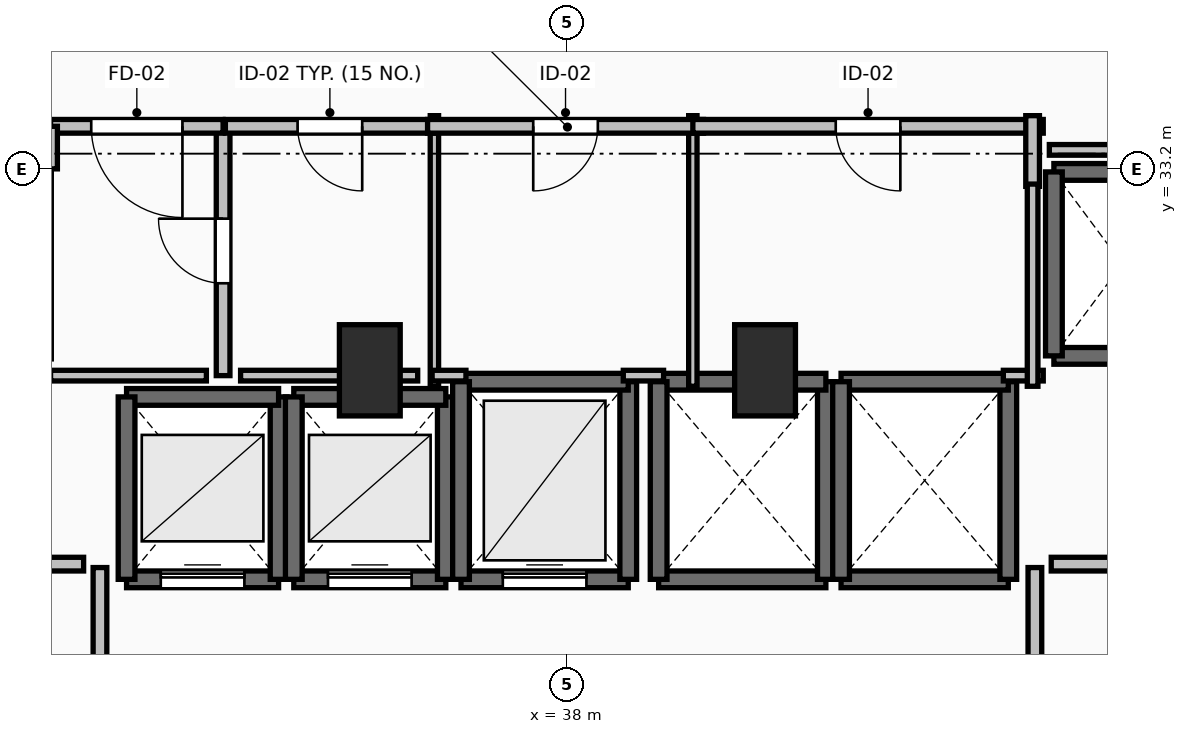
"""IFC4 building model, lengths in metres.
Left out: names, types, materials, properties, quantities, classifications, styles, units other than length and angle.
Written with IfcOpenShell. Run it as: python <this file> out.ifc"""

import sys

from ifc_helpers import new_model, si_unit, direction, frame, frame_2d, origin, origin_2d, place, context, subcontext, project, spatial, rectangle, extrude, element, fill, save


model = new_model("IFC4")
c1 = context("Model", 3, precision=1e-05, world=origin(), true_north=direction((0.0, 1.0)))
c2 = subcontext(c1, "Body", "Model", "MODEL_VIEW")
j1 = project(units=[si_unit("LENGTHUNIT", "METRE"), si_unit("PLANEANGLEUNIT", "RADIAN")], contexts=[c1])
p1 = place(None, origin())
s1 = spatial("IfcSite", under=j1, at=p1, CompositionType="ELEMENT")
p2 = place(p1, origin())
s2 = spatial("IfcBuilding", under=s1, at=p2, CompositionType="ELEMENT")
p3 = place(p2, frame((0.0, 0.0, 48.5)))
s3 = spatial("IfcBuildingStorey", under=s2, at=p3, CompositionType="ELEMENT", Elevation=48.5)
for number, where, z_axis, x_axis in (
    (1, (35.4, 30.55, 0.0), (0.0, 0.0, 1.0), (1.0, 0.0, 0.0)),
    (2, (40.6, 30.55, 0.0), (0.0, 0.0, 1.0), (1.0, 0.0, 0.0)),
):
    element("IfcColumn", number, at=place(p3, frame(where, z_axis=z_axis, x_axis=x_axis)), inside=s3, PredefinedType="PILASTER", context=c2, shape_type="SweptSolid", body=[
        extrude(rectangle(XDim=0.8, YDim=1.2, at=origin_2d()), origin(), (0.0, 0.0, 1.0), 3.5),
    ])
p4 = place(p3, frame((32.2, 27.8, 0.0), z_axis=(0.0, 0.0, 1.0), x_axis=(1.0, 0.0, 0.0)))
e3 = element("IfcWall", 3, at=p4, inside=s3, PredefinedType="SOLIDWALL", context=c2, shape_type="SweptSolid", body=[
    extrude(rectangle(XDim=2.0, YDim=0.22, at=frame_2d((1.0, 0.0))), origin(), (0.0, 0.0, 1.0), 3.24),
])
p5 = place(p4, frame((0.45, 0.0, 0.0)))
e4 = element("IfcOpeningElement", 4, at=p5, cuts=e3, PredefinedType="OPENING", context=c2, shape_type="SweptSolid", body=[
    extrude(rectangle(XDim=1.1, YDim=2.2, at=frame_2d((0.55, 1.1))), frame((0.0, 0.125, 0.0), z_axis=(0.0, -1.0, 0.0), x_axis=(1.0, 0.0, 0.0)), (0.0, 0.0, 1.0), 0.25),
])
p6 = place(p3, frame((34.2, 27.8, 0.0), z_axis=(0.0, 0.0, 1.0), x_axis=(0.0, 1.0, 0.0)))
e5 = element("IfcWall", 5, at=p6, inside=s3, PredefinedType="SOLIDWALL", context=c2, shape_type="SweptSolid", body=[
    extrude(rectangle(XDim=2.4, YDim=0.22, at=frame_2d((1.2, 0.0))), origin(), (0.0, 0.0, 1.0), 3.24),
])
p7 = place(p3, frame((34.2, 30.2, 0.0), z_axis=(0.0, 0.0, 1.0), x_axis=(-1.0, 0.0, 0.0)))
e6 = element("IfcWall", 6, at=p7, inside=s3, PredefinedType="SOLIDWALL", context=c2, shape_type="SweptSolid", body=[
    extrude(rectangle(XDim=2.0, YDim=0.22, at=frame_2d((1.0, 0.0))), origin(), (0.0, 0.0, 1.0), 3.24),
])
p8 = place(p3, frame((32.2, 30.2, 0.0), z_axis=(0.0, 0.0, 1.0), x_axis=(0.0, -1.0, 0.0)))
e7 = element("IfcWall", 7, at=p8, inside=s3, PredefinedType="SOLIDWALL", context=c2, shape_type="SweptSolid", body=[
    extrude(rectangle(XDim=2.4, YDim=0.22, at=frame_2d((1.2, 0.0))), origin(), (0.0, 0.0, 1.0), 3.24),
])
p9 = place(p3, frame((34.4, 27.8, 0.0), z_axis=(0.0, 0.0, 1.0), x_axis=(1.0, 0.0, 0.0)))
e8 = element("IfcWall", 8, at=p9, inside=s3, PredefinedType="SOLIDWALL", context=c2, shape_type="SweptSolid", body=[
    extrude(rectangle(XDim=2.0, YDim=0.22, at=frame_2d((1.0, 0.0))), origin(), (0.0, 0.0, 1.0), 3.24),
])
p10 = place(p9, frame((0.45, 0.0, 0.0)))
e9 = element("IfcOpeningElement", 9, at=p10, cuts=e8, PredefinedType="OPENING", context=c2, shape_type="SweptSolid", body=[
    extrude(rectangle(XDim=1.1, YDim=2.2, at=frame_2d((0.55, 1.1))), frame((0.0, 0.125, 0.0), z_axis=(0.0, -1.0, 0.0), x_axis=(1.0, 0.0, 0.0)), (0.0, 0.0, 1.0), 0.25),
])
p11 = place(p3, frame((36.4, 27.8, 0.0), z_axis=(0.0, 0.0, 1.0), x_axis=(0.0, 1.0, 0.0)))
e10 = element("IfcWall", 10, at=p11, inside=s3, PredefinedType="SOLIDWALL", context=c2, shape_type="SweptSolid", body=[
    extrude(rectangle(XDim=2.4, YDim=0.22, at=frame_2d((1.2, 0.0))), origin(), (0.0, 0.0, 1.0), 3.24),
])
p12 = place(p3, frame((36.4, 30.2, 0.0), z_axis=(0.0, 0.0, 1.0), x_axis=(-1.0, 0.0, 0.0)))
e11 = element("IfcWall", 11, at=p12, inside=s3, PredefinedType="SOLIDWALL", context=c2, shape_type="SweptSolid", body=[
    extrude(rectangle(XDim=2.0, YDim=0.22, at=frame_2d((1.0, 0.0))), origin(), (0.0, 0.0, 1.0), 3.24),
])
p13 = place(p3, frame((34.4, 30.2, 0.0), z_axis=(0.0, 0.0, 1.0), x_axis=(0.0, -1.0, 0.0)))
e12 = element("IfcWall", 12, at=p13, inside=s3, PredefinedType="SOLIDWALL", context=c2, shape_type="SweptSolid", body=[
    extrude(rectangle(XDim=2.4, YDim=0.22, at=frame_2d((1.2, 0.0))), origin(), (0.0, 0.0, 1.0), 3.24),
])
p14 = place(p3, frame((36.6, 27.8, 0.0), z_axis=(0.0, 0.0, 1.0), x_axis=(1.0, 0.0, 0.0)))
e13 = element("IfcWall", 13, at=p14, inside=s3, PredefinedType="SOLIDWALL", context=c2, shape_type="SweptSolid", body=[
    extrude(rectangle(XDim=2.2, YDim=0.22, at=frame_2d((1.1, 0.0))), origin(), (0.0, 0.0, 1.0), 3.24),
])
p15 = place(p14, frame((0.55, 0.0, 0.0)))
e14 = element("IfcOpeningElement", 14, at=p15, cuts=e13, PredefinedType="OPENING", context=c2, shape_type="SweptSolid", body=[
    extrude(rectangle(XDim=1.1, YDim=2.2, at=frame_2d((0.55, 1.1))), frame((0.0, 0.125, 0.0), z_axis=(0.0, -1.0, 0.0), x_axis=(1.0, 0.0, 0.0)), (0.0, 0.0, 1.0), 0.25),
])
p16 = place(p3, frame((38.8, 27.8, 0.0), z_axis=(0.0, 0.0, 1.0), x_axis=(0.0, 1.0, 0.0)))
e15 = element("IfcWall", 15, at=p16, inside=s3, PredefinedType="SOLIDWALL", context=c2, shape_type="SweptSolid", body=[
    extrude(rectangle(XDim=2.6, YDim=0.22, at=frame_2d((1.3, 0.0))), origin(), (0.0, 0.0, 1.0), 3.24),
])
p17 = place(p3, frame((38.8, 30.4, 0.0), z_axis=(0.0, 0.0, 1.0), x_axis=(-1.0, 0.0, 0.0)))
e16 = element("IfcWall", 16, at=p17, inside=s3, PredefinedType="SOLIDWALL", context=c2, shape_type="SweptSolid", body=[
    extrude(rectangle(XDim=2.2, YDim=0.22, at=frame_2d((1.1, 0.0))), origin(), (0.0, 0.0, 1.0), 3.24),
])
p18 = place(p3, frame((36.6, 30.4, 0.0), z_axis=(0.0, 0.0, 1.0), x_axis=(0.0, -1.0, 0.0)))
e17 = element("IfcWall", 17, at=p18, inside=s3, PredefinedType="SOLIDWALL", context=c2, shape_type="SweptSolid", body=[
    extrude(rectangle(XDim=2.6, YDim=0.22, at=frame_2d((1.3, 0.0))), origin(), (0.0, 0.0, 1.0), 3.24),
])
p19 = place(p3, frame((39.2, 27.8, 0.0), z_axis=(0.0, 0.0, 1.0), x_axis=(1.0, 0.0, 0.0)))
e18 = element("IfcWall", 18, at=p19, inside=s3, PredefinedType="SOLIDWALL", context=c2, shape_type="SweptSolid", body=[
    extrude(rectangle(XDim=2.2, YDim=0.22, at=frame_2d((1.1, 0.0))), origin(), (0.0, 0.0, 1.0), 3.24),
])
p20 = place(p3, frame((41.4, 27.8, 0.0), z_axis=(0.0, 0.0, 1.0), x_axis=(0.0, 1.0, 0.0)))
e19 = element("IfcWall", 19, at=p20, inside=s3, PredefinedType="SOLIDWALL", context=c2, shape_type="SweptSolid", body=[
    extrude(rectangle(XDim=2.6, YDim=0.22, at=frame_2d((1.3, 0.0))), origin(), (0.0, 0.0, 1.0), 3.24),
])
p21 = place(p3, frame((41.4, 30.4, 0.0), z_axis=(0.0, 0.0, 1.0), x_axis=(-1.0, 0.0, 0.0)))
e20 = element("IfcWall", 20, at=p21, inside=s3, PredefinedType="SOLIDWALL", context=c2, shape_type="SweptSolid", body=[
    extrude(rectangle(XDim=2.2, YDim=0.22, at=frame_2d((1.1, 0.0))), origin(), (0.0, 0.0, 1.0), 3.24),
])
p22 = place(p3, frame((39.2, 30.4, 0.0), z_axis=(0.0, 0.0, 1.0), x_axis=(0.0, -1.0, 0.0)))
e21 = element("IfcWall", 21, at=p22, inside=s3, PredefinedType="SOLIDWALL", context=c2, shape_type="SweptSolid", body=[
    extrude(rectangle(XDim=2.6, YDim=0.22, at=frame_2d((1.3, 0.0))), origin(), (0.0, 0.0, 1.0), 3.24),
])
p23 = place(p3, frame((41.6, 27.8, 0.0), z_axis=(0.0, 0.0, 1.0), x_axis=(1.0, 0.0, 0.0)))
e22 = element("IfcWall", 22, at=p23, inside=s3, PredefinedType="SOLIDWALL", context=c2, shape_type="SweptSolid", body=[
    extrude(rectangle(XDim=2.2, YDim=0.22, at=frame_2d((1.1, 0.0))), origin(), (0.0, 0.0, 1.0), 3.24),
])
p24 = place(p3, frame((43.8, 27.8, 0.0), z_axis=(0.0, 0.0, 1.0), x_axis=(0.0, 1.0, 0.0)))
e23 = element("IfcWall", 23, at=p24, inside=s3, PredefinedType="SOLIDWALL", context=c2, shape_type="SweptSolid", body=[
    extrude(rectangle(XDim=2.6, YDim=0.22, at=frame_2d((1.3, 0.0))), origin(), (0.0, 0.0, 1.0), 3.24),
])
p25 = place(p3, frame((43.8, 30.4, 0.0), z_axis=(0.0, 0.0, 1.0), x_axis=(-1.0, 0.0, 0.0)))
e24 = element("IfcWall", 24, at=p25, inside=s3, PredefinedType="SOLIDWALL", context=c2, shape_type="SweptSolid", body=[
    extrude(rectangle(XDim=2.2, YDim=0.22, at=frame_2d((1.1, 0.0))), origin(), (0.0, 0.0, 1.0), 3.24),
])
p26 = place(p3, frame((41.6, 30.4, 0.0), z_axis=(0.0, 0.0, 1.0), x_axis=(0.0, -1.0, 0.0)))
e25 = element("IfcWall", 25, at=p26, inside=s3, PredefinedType="SOLIDWALL", context=c2, shape_type="SweptSolid", body=[
    extrude(rectangle(XDim=2.6, YDim=0.22, at=frame_2d((1.3, 0.0))), origin(), (0.0, 0.0, 1.0), 3.24),
])
for number, where, z_axis, x_axis in (
    (26, (44.4, 30.74, 0.0), (0.0, 0.0, 1.0), (1.0, 0.0, 0.0)),
    (27, (46.2, 33.16, 0.0), (0.0, 0.0, 1.0), (-1.0, 0.0, 0.0)),
):
    element("IfcWall", number, at=place(p3, frame(where, z_axis=z_axis, x_axis=x_axis)), inside=s3, PredefinedType="SOLIDWALL", context=c2, shape_type="SweptSolid", body=[
        extrude(rectangle(XDim=1.8, YDim=0.22, at=frame_2d((0.9, 0.0))), origin(), (0.0, 0.0, 1.0), 3.24),
    ])
p27 = place(p3, frame((44.4, 33.16, 0.0), z_axis=(0.0, 0.0, 1.0), x_axis=(0.0, -1.0, 0.0)))
e28 = element("IfcWall", 28, at=p27, inside=s3, PredefinedType="SOLIDWALL", context=c2, shape_type="SweptSolid", body=[
    extrude(rectangle(XDim=2.42, YDim=0.22, at=frame_2d((1.21, 0.0))), origin(), (0.0, 0.0, 1.0), 3.24),
])
p28 = place(p3, frame((31.85, 24.045, 0.0), z_axis=(0.0, 0.0, 1.0), x_axis=(0.0, 1.0, 0.0)))
e29 = element("IfcWall", 29, at=p28, inside=s3, PredefinedType="PARTITIONING", context=c2, shape_type="SweptSolid", body=[
    extrude(rectangle(XDim=3.91, YDim=0.18, at=frame_2d((1.955, 0.0))), origin(), (0.0, 0.0, 1.0), 3.24),
])
p29 = place(p28, frame((1.355, 0.0, 0.0)))
e30 = element("IfcOpeningElement", 30, at=p29, cuts=e29, PredefinedType="OPENING", context=c2, shape_type="SweptSolid", body=[
    extrude(rectangle(XDim=1.2, YDim=2.15, at=frame_2d((0.6, 1.075))), frame((0.0, 0.105, 0.0), z_axis=(0.0, -1.0, 0.0), x_axis=(1.0, 0.0, 0.0)), (0.0, 0.0, 1.0), 0.21),
])
p30 = place(p3, frame((44.15, 27.955, 0.0), z_axis=(0.0, 0.0, 1.0), x_axis=(0.0, -1.0, 0.0)))
e31 = element("IfcWall", 31, at=p30, inside=s3, PredefinedType="PARTITIONING", context=c2, shape_type="SweptSolid", body=[
    extrude(rectangle(XDim=3.91, YDim=0.18, at=frame_2d((1.955, 0.0))), origin(), (0.0, 0.0, 1.0), 3.24),
])
p31 = place(p30, frame((1.355, 0.0, 0.0)))
e32 = element("IfcOpeningElement", 32, at=p31, cuts=e31, PredefinedType="OPENING", context=c2, shape_type="SweptSolid", body=[
    extrude(rectangle(XDim=1.2, YDim=2.15, at=frame_2d((0.6, 1.075))), frame((0.0, 0.105, 0.0), z_axis=(0.0, -1.0, 0.0), x_axis=(1.0, 0.0, 0.0)), (0.0, 0.0, 1.0), 0.21),
])
p32 = place(p3, frame((33.47, 30.48, 0.0), z_axis=(0.0, 0.0, 1.0), x_axis=(0.0, 1.0, 0.0)))
e33 = element("IfcWall", 33, at=p32, inside=s3, PredefinedType="PARTITIONING", context=c2, shape_type="SweptSolid", body=[
    extrude(rectangle(XDim=3.28, YDim=0.18, at=frame_2d((1.64, 0.0))), origin(), (0.0, 0.0, 1.0), 3.24),
])
p33 = place(p32, frame((1.215, 0.0, 0.0)))
e34 = element("IfcOpeningElement", 34, at=p33, cuts=e33, PredefinedType="OPENING", context=c2, shape_type="SweptSolid", body=[
    extrude(rectangle(XDim=0.85, YDim=2.1, at=frame_2d((0.425, 1.05))), frame((0.0, 0.105, 0.0), z_axis=(0.0, -1.0, 0.0), x_axis=(1.0, 0.0, 0.0)), (0.0, 0.0, 1.0), 0.21),
])
p34 = place(p3, frame((33.47, 33.76, 0.0), z_axis=(0.0, 0.0, 1.0), x_axis=(-1.0, 0.0, 0.0)))
e35 = element("IfcWall", 35, at=p34, inside=s3, PredefinedType="PARTITIONING", context=c2, shape_type="SweptSolid", body=[
    extrude(rectangle(XDim=2.27, YDim=0.18, at=frame_2d((1.135, 0.0))), origin(), (0.0, 0.0, 1.0), 3.24),
])
p35 = place(p34, frame((0.535, 0.0, 0.0)))
e36 = element("IfcOpeningElement", 36, at=p35, cuts=e35, PredefinedType="OPENING", context=c2, shape_type="SweptSolid", body=[
    extrude(rectangle(XDim=1.2, YDim=2.15, at=frame_2d((0.6, 1.075))), frame((0.0, 0.105, 0.0), z_axis=(0.0, -1.0, 0.0), x_axis=(1.0, 0.0, 0.0)), (0.0, 0.0, 1.0), 0.21),
])
p36 = place(p3, frame((31.2, 33.76, 0.0), z_axis=(0.0, 0.0, 1.0), x_axis=(0.0, -1.0, 0.0)))
e37 = element("IfcWall", 37, at=p36, inside=s3, PredefinedType="PARTITIONING", context=c2, shape_type="SweptSolid", body=[
    extrude(rectangle(XDim=0.56, YDim=0.18, at=frame_2d((0.28, 0.0))), origin(), (0.0, 0.0, 1.0), 3.24),
])
p37 = place(p3, frame((36.25, 30.34, 0.0), z_axis=(0.0, 0.0, 1.0), x_axis=(0.0, 1.0, 0.0)))
e38 = element("IfcWall", 38, at=p37, inside=s3, PredefinedType="PARTITIONING", context=c2, shape_type="SweptSolid", body=[
    extrude(rectangle(XDim=3.56, YDim=0.11, at=frame_2d((1.78, 0.0))), origin(), (0.0, 0.0, 1.0), 2.432),
])
p38 = place(p3, frame((36.25, 33.76, 0.0), z_axis=(0.0, 0.0, 1.0), x_axis=(-1.0, 0.0, 0.0)))
e39 = element("IfcWall", 39, at=p38, inside=s3, PredefinedType="PARTITIONING", context=c2, shape_type="SweptSolid", body=[
    extrude(rectangle(XDim=2.75, YDim=0.18, at=frame_2d((1.375, 0.0))), origin(), (0.0, 0.0, 1.0), 3.24),
])
p39 = place(p38, frame((0.95, 0.0, 0.0)))
e40 = element("IfcOpeningElement", 40, at=p39, cuts=e39, PredefinedType="OPENING", context=c2, shape_type="SweptSolid", body=[
    extrude(rectangle(XDim=0.85, YDim=2.1, at=frame_2d((0.425, 1.05))), frame((0.0, 0.105, 0.0), z_axis=(0.0, -1.0, 0.0), x_axis=(1.0, 0.0, 0.0)), (0.0, 0.0, 1.0), 0.21),
])
p40 = place(p3, frame((39.65, 30.34, 0.0), z_axis=(0.0, 0.0, 1.0), x_axis=(0.0, 1.0, 0.0)))
e41 = element("IfcWall", 41, at=p40, inside=s3, PredefinedType="PARTITIONING", context=c2, shape_type="SweptSolid", body=[
    extrude(rectangle(XDim=3.56, YDim=0.11, at=frame_2d((1.78, 0.0))), origin(), (0.0, 0.0, 1.0), 2.432),
])
p41 = place(p3, frame((39.79, 33.76, 0.0), z_axis=(0.0, 0.0, 1.0), x_axis=(-1.0, 0.0, 0.0)))
e42 = element("IfcWall", 42, at=p41, inside=s3, PredefinedType="PARTITIONING", context=c2, shape_type="SweptSolid", body=[
    extrude(rectangle(XDim=3.63, YDim=0.18, at=frame_2d((1.815, 0.0))), origin(), (0.0, 0.0, 1.0), 3.24),
])
p42 = place(p41, frame((1.39, 0.0, 0.0)))
e43 = element("IfcOpeningElement", 43, at=p42, cuts=e42, PredefinedType="OPENING", context=c2, shape_type="SweptSolid", body=[
    extrude(rectangle(XDim=0.85, YDim=2.1, at=frame_2d((0.425, 1.05))), frame((0.0, 0.105, 0.0), z_axis=(0.0, -1.0, 0.0), x_axis=(1.0, 0.0, 0.0)), (0.0, 0.0, 1.0), 0.21),
])
p43 = place(p3, frame((44.26, 33.76, 0.0), z_axis=(0.0, 0.0, 1.0), x_axis=(-1.0, 0.0, 0.0)))
e44 = element("IfcWall", 44, at=p43, inside=s3, PredefinedType="PARTITIONING", context=c2, shape_type="SweptSolid", body=[
    extrude(rectangle(XDim=4.61, YDim=0.18, at=frame_2d((2.305, 0.0))), origin(), (0.0, 0.0, 1.0), 3.24),
])
p44 = place(p43, frame((1.88, 0.0, 0.0)))
e45 = element("IfcOpeningElement", 45, at=p44, cuts=e44, PredefinedType="OPENING", context=c2, shape_type="SweptSolid", body=[
    extrude(rectangle(XDim=0.85, YDim=2.1, at=frame_2d((0.425, 1.05))), frame((0.0, 0.105, 0.0), z_axis=(0.0, -1.0, 0.0), x_axis=(1.0, 0.0, 0.0)), (0.0, 0.0, 1.0), 0.21),
])
p45 = place(p3, frame((44.12, 32.97, 0.0), z_axis=(0.0, 0.0, 1.0), x_axis=(0.0, 1.0, 0.0)))
e46 = element("IfcWall", 46, at=p45, inside=s3, PredefinedType="PARTITIONING", context=c2, shape_type="SweptSolid", body=[
    extrude(rectangle(XDim=0.93, YDim=0.18, at=frame_2d((0.465, 0.0))), origin(), (0.0, 0.0, 1.0), 3.24),
])
for number, where, z_axis, x_axis in (
    (47, (31.635, 28.0, 0.0), (0.0, 0.0, 1.0), (-1.0, 0.0, 0.0)),
    (48, (45.28, 28.0, 0.0), (0.0, 0.0, 1.0), (-1.0, 0.0, 0.0)),
):
    element("IfcWall", number, at=place(p3, frame(where, z_axis=z_axis, x_axis=x_axis)), inside=s3, PredefinedType="PARTITIONING", context=c2, shape_type="SweptSolid", body=[
        extrude(rectangle(XDim=0.915, YDim=0.18, at=frame_2d((0.458, 0.0))), origin(), (0.0, 0.0, 1.0), 3.24),
    ])
p46 = place(p3, frame((31.2, 30.48, 0.0), z_axis=(0.0, 0.0, 1.0), x_axis=(1.0, 0.0, 0.0)))
e49 = element("IfcWall", 49, at=p46, inside=s3, PredefinedType="PARTITIONING", context=c2, shape_type="SweptSolid", body=[
    extrude(rectangle(XDim=2.05, YDim=0.14, at=frame_2d((1.025, 0.0))), origin(), (0.0, 0.0, 1.0), 3.24),
])
p47 = place(p3, frame((33.7, 30.48, 0.0), z_axis=(0.0, 0.0, 1.0), x_axis=(1.0, 0.0, 0.0)))
e50 = element("IfcWall", 50, at=p47, inside=s3, PredefinedType="PARTITIONING", context=c2, shape_type="SweptSolid", body=[
    extrude(rectangle(XDim=2.33, YDim=0.14, at=frame_2d((1.165, 0.0))), origin(), (0.0, 0.0, 1.0), 2.432),
])
p48 = place(p3, frame((36.22, 30.48, 0.0), z_axis=(0.0, 0.0, 1.0), x_axis=(1.0, 0.0, 0.0)))
e51 = element("IfcWall", 51, at=p48, inside=s3, PredefinedType="PARTITIONING", context=c2, shape_type="SweptSolid", body=[
    extrude(rectangle(XDim=0.445, YDim=0.14, at=frame_2d((0.223, 0.0))), origin(), (0.0, 0.0, 1.0), 2.432),
])
p49 = place(p3, frame((38.735, 30.48, 0.0), z_axis=(0.0, 0.0, 1.0), x_axis=(1.0, 0.0, 0.0)))
e52 = element("IfcWall", 52, at=p49, inside=s3, PredefinedType="PARTITIONING", context=c2, shape_type="SweptSolid", body=[
    extrude(rectangle(XDim=0.53, YDim=0.14, at=frame_2d((0.265, 0.0))), origin(), (0.0, 0.0, 1.0), 2.432),
])
p50 = place(p3, frame((43.735, 30.48, 0.0), z_axis=(0.0, 0.0, 1.0), x_axis=(1.0, 0.0, 0.0)))
e53 = element("IfcWall", 53, at=p50, inside=s3, PredefinedType="PARTITIONING", context=c2, shape_type="SweptSolid", body=[
    extrude(rectangle(XDim=0.525, YDim=0.14, at=frame_2d((0.262, 0.0))), origin(), (0.0, 0.0, 1.0), 3.24),
])
p51 = place(p3, frame((44.12, 30.34, 0.0), z_axis=(0.0, 0.0, 1.0), x_axis=(0.0, 1.0, 0.0)))
e54 = element("IfcWall", 54, at=p51, inside=s3, PredefinedType="PARTITIONING", context=c2, shape_type="SweptSolid", body=[
    extrude(rectangle(XDim=2.66, YDim=0.14, at=frame_2d((1.33, 0.0))), origin(), (0.0, 0.0, 1.0), 3.24),
])
p52 = place(p3, frame((44.34, 33.45, 0.0), z_axis=(0.0, 0.0, 1.0), x_axis=(1.0, 0.0, 0.0)))
e55 = element("IfcWall", 55, at=p52, inside=s3, PredefinedType="PARTITIONING", context=c2, shape_type="SweptSolid", body=[
    extrude(rectangle(XDim=4.21, YDim=0.14, at=frame_2d((2.105, 0.0))), origin(), (0.0, 0.0, 1.0), 2.432),
])
p53 = place(p5, origin())
e56 = element("IfcDoor", 56, at=p53, inside=s3, OperationType="SLIDING_TO_LEFT", PredefinedType="DOOR", context=c2, shape_type="SweptSolid", body=[
    extrude(rectangle(XDim=1.1, YDim=2.2, at=frame_2d((0.55, 1.1))), frame((0.0, 0.025, 0.0), z_axis=(0.0, -1.0, 0.0), x_axis=(1.0, 0.0, 0.0)), (0.0, 0.0, 1.0), 0.05),
])
fill(e4, e56)
p54 = place(p10, origin())
e57 = element("IfcDoor", 57, at=p54, inside=s3, OperationType="SLIDING_TO_LEFT", PredefinedType="DOOR", context=c2, shape_type="SweptSolid", body=[
    extrude(rectangle(XDim=1.1, YDim=2.2, at=frame_2d((0.55, 1.1))), frame((0.0, 0.025, 0.0), z_axis=(0.0, -1.0, 0.0), x_axis=(1.0, 0.0, 0.0)), (0.0, 0.0, 1.0), 0.05),
])
fill(e9, e57)
p55 = place(p15, origin())
e58 = element("IfcDoor", 58, at=p55, inside=s3, OperationType="SLIDING_TO_LEFT", PredefinedType="DOOR", context=c2, shape_type="SweptSolid", body=[
    extrude(rectangle(XDim=1.1, YDim=2.2, at=frame_2d((0.55, 1.1))), frame((0.0, 0.025, 0.0), z_axis=(0.0, -1.0, 0.0), x_axis=(1.0, 0.0, 0.0)), (0.0, 0.0, 1.0), 0.05),
])
fill(e14, e58)
p56 = place(p33, origin())
e59 = element("IfcDoor", 59, at=p56, inside=s3, OperationType="SINGLE_SWING_RIGHT", PredefinedType="DOOR", context=c2, shape_type="SweptSolid", body=[
    extrude(rectangle(XDim=0.85, YDim=2.1, at=frame_2d((0.425, 1.05))), frame((0.0, 0.025, 0.0), z_axis=(0.0, -1.0, 0.0), x_axis=(1.0, 0.0, 0.0)), (0.0, 0.0, 1.0), 0.05),
])
fill(e34, e59)
p57 = place(p35, origin())
e60 = element("IfcDoor", 60, at=p57, inside=s3, OperationType="SINGLE_SWING_LEFT", PredefinedType="DOOR", context=c2, shape_type="SweptSolid", body=[
    extrude(rectangle(XDim=1.2, YDim=2.15, at=frame_2d((0.6, 1.075))), frame((0.0, 0.025, 0.0), z_axis=(0.0, -1.0, 0.0), x_axis=(1.0, 0.0, 0.0)), (0.0, 0.0, 1.0), 0.05),
])
fill(e36, e60)
p58 = place(p39, origin())
e61 = element("IfcDoor", 61, at=p58, inside=s3, OperationType="SINGLE_SWING_LEFT", PredefinedType="DOOR", context=c2, shape_type="SweptSolid", body=[
    extrude(rectangle(XDim=0.85, YDim=2.1, at=frame_2d((0.425, 1.05))), frame((0.0, 0.025, 0.0), z_axis=(0.0, -1.0, 0.0), x_axis=(1.0, 0.0, 0.0)), (0.0, 0.0, 1.0), 0.05),
])
fill(e40, e61)
p59 = place(p42, origin())
e62 = element("IfcDoor", 62, at=p59, inside=s3, OperationType="SINGLE_SWING_RIGHT", PredefinedType="DOOR", context=c2, shape_type="SweptSolid", body=[
    extrude(rectangle(XDim=0.85, YDim=2.1, at=frame_2d((0.425, 1.05))), frame((0.0, 0.025, 0.0), z_axis=(0.0, -1.0, 0.0), x_axis=(1.0, 0.0, 0.0)), (0.0, 0.0, 1.0), 0.05),
])
fill(e43, e62)
p60 = place(p44, origin())
e63 = element("IfcDoor", 63, at=p60, inside=s3, OperationType="SINGLE_SWING_LEFT", PredefinedType="DOOR", context=c2, shape_type="SweptSolid", body=[
    extrude(rectangle(XDim=0.85, YDim=2.1, at=frame_2d((0.425, 1.05))), frame((0.0, 0.025, 0.0), z_axis=(0.0, -1.0, 0.0), x_axis=(1.0, 0.0, 0.0)), (0.0, 0.0, 1.0), 0.05),
])
fill(e45, e63)
save(model, sys.argv[1])
